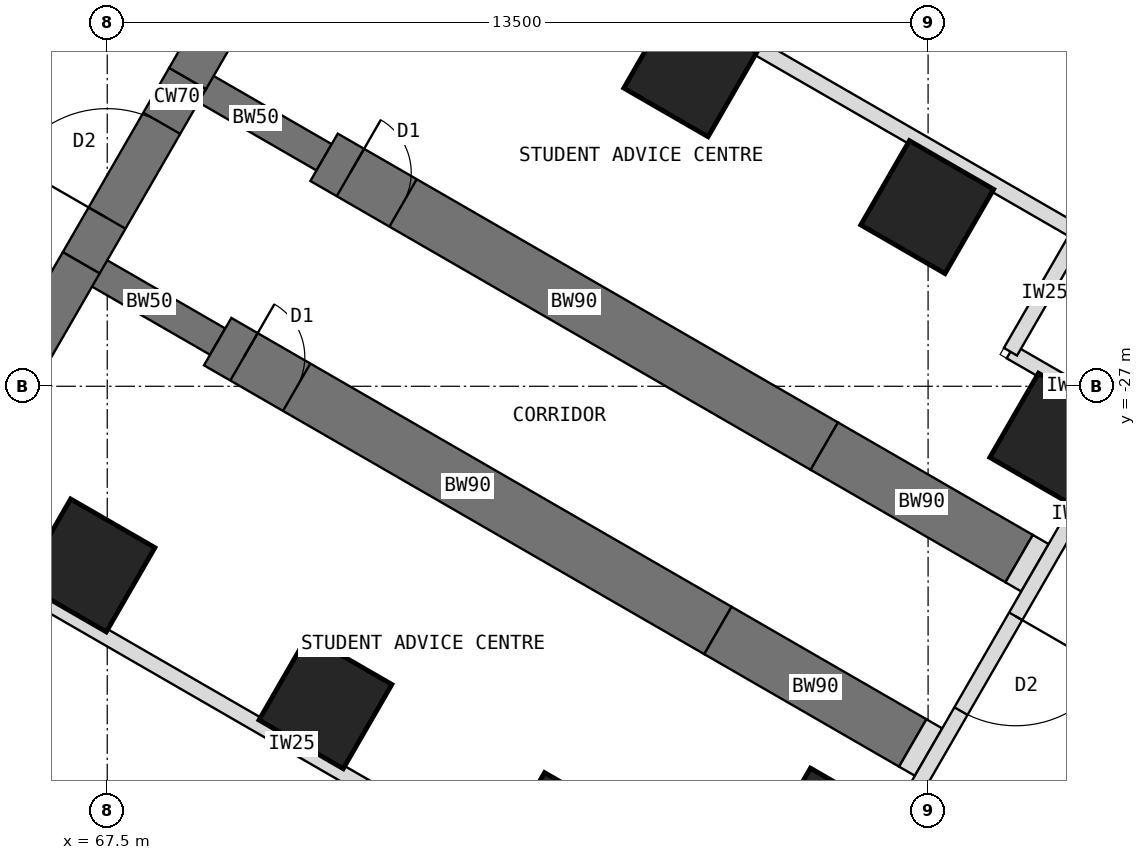
"""IFC4 building model, lengths in metres.
Left out: names, types, materials, properties, quantities, classifications, styles, units other than length and angle.
Written with IfcOpenShell. Run it as: python <this file> out.ifc"""

import sys

from ifc_helpers import new_model, si_unit, direction, frame, frame_2d, origin, origin_2d, place, context, subcontext, project, spatial, rectangle, extrude, element, fill, save


model = new_model("IFC4")
c1 = context("Model", 3, precision=1e-05, world=origin(), true_north=direction((0.0, 1.0)))
c2 = subcontext(c1, "Body", "Model", "MODEL_VIEW")
j1 = project(units=[si_unit("LENGTHUNIT", "METRE"), si_unit("PLANEANGLEUNIT", "RADIAN")], contexts=[c1])
p1 = place(None, origin())
s1 = spatial("IfcSite", under=j1, at=p1, CompositionType="ELEMENT")
p2 = place(p1, origin())
s2 = spatial("IfcBuilding", under=s1, at=p2, CompositionType="ELEMENT")
p3 = place(p2, origin())
s3 = spatial("IfcBuildingStorey", under=s2, at=p3, CompositionType="ELEMENT", Elevation=0.0)
p4 = place(p3, frame((64.798, -28.908, 0.0), z_axis=(0.0, 0.0, 1.0), x_axis=(0.499984222037, 0.866034513004, 0.0)))
e1 = element("IfcWall", 1, at=p4, inside=s3, PredefinedType="SHEAR", context=c2, shape_type="SweptSolid", body=[
    extrude(rectangle(XDim=4.548, YDim=0.7, at=frame_2d((2.274, 0.0))), origin(), (0.0, 0.0, 1.0), 5.5),
])
p5 = place(p3, frame((67.072, -24.97, 0.0), z_axis=(0.0, 0.0, 1.0), x_axis=(0.500010275428, 0.866019471182, 0.0)))
e2 = element("IfcWall", 2, at=p5, inside=s3, PredefinedType="SHEAR", context=c2, shape_type="SweptSolid", body=[
    extrude(rectangle(XDim=3.5, YDim=0.7, at=frame_2d((1.75, 0.0))), origin(), (0.0, 0.0, 1.0), 5.5),
])
p6 = place(p5, frame((0.85, 0.0, 0.0)))
e3 = element("IfcOpeningElement", 3, at=p6, cuts=e2, PredefinedType="OPENING", context=c2, shape_type="SweptSolid", body=[
    extrude(rectangle(XDim=1.8, YDim=2.1, at=frame_2d((0.9, 1.05))), frame((0.0, 0.36, 0.0), z_axis=(0.0, -1.0, 0.0), x_axis=(1.0, 0.0, 0.0)), (0.0, 0.0, 1.0), 0.72),
])
p7 = place(p3, frame((68.822, -21.939, 0.0), z_axis=(0.0, 0.0, 1.0), x_axis=(0.500024481964, 0.866011268655, 0.0)))
e4 = element("IfcWall", 4, at=p7, inside=s3, PredefinedType="SHEAR", context=c2, shape_type="SweptSolid", body=[
    extrude(rectangle(XDim=4.548, YDim=0.7, at=frame_2d((2.274, 0.0))), origin(), (0.0, 0.0, 1.0), 5.5),
])
p8 = place(p3, frame((68.822, -21.939, 0.0), z_axis=(0.0, 0.0, 1.0), x_axis=(0.866072649678, -0.499918158782, 0.0)))
e5 = element("IfcWall", 5, at=p8, inside=s3, PredefinedType="SHEAR", context=c2, shape_type="SweptSolid", body=[
    extrude(rectangle(XDim=2.592, YDim=0.5, at=frame_2d((1.296, 0.0))), origin(), (0.0, 0.0, 1.0), 5.5),
])
p9 = place(p3, frame((71.066, -23.234, 0.0), z_axis=(0.0, 0.0, 1.0), x_axis=(0.86602681393, -0.499997557548, 0.0)))
e6 = element("IfcWall", 6, at=p9, inside=s3, PredefinedType="SHEAR", context=c2, shape_type="SweptSolid", body=[
    extrude(rectangle(XDim=9.5, YDim=0.9, at=frame_2d((4.75, 0.0))), origin(), (0.0, 0.0, 1.0), 5.5),
])
p10 = place(p9, frame((0.5, 0.0, 0.0)))
e7 = element("IfcOpeningElement", 7, at=p10, cuts=e6, PredefinedType="OPENING", context=c2, shape_type="SweptSolid", body=[
    extrude(rectangle(XDim=1.0, YDim=2.1, at=frame_2d((0.5, 1.05))), frame((0.0, 0.46, 0.0), z_axis=(0.0, -1.0, 0.0), x_axis=(1.0, 0.0, 0.0)), (0.0, 0.0, 1.0), 0.92),
])
p11 = place(p3, frame((79.294, -27.984, 0.0), z_axis=(0.0, 0.0, 1.0), x_axis=(0.866000971088, -0.500042316284, 0.0)))
e8 = element("IfcWall", 8, at=p11, inside=s3, PredefinedType="SHEAR", context=c2, shape_type="SweptSolid", body=[
    extrude(rectangle(XDim=3.7, YDim=0.9, at=frame_2d((1.85, 0.0))), origin(), (0.0, 0.0, 1.0), 5.5),
])
p12 = place(p3, frame((67.072, -24.97, 0.0), z_axis=(0.0, 0.0, 1.0), x_axis=(0.866031863473, -0.499988811324, 0.0)))
e9 = element("IfcWall", 9, at=p12, inside=s3, PredefinedType="SHEAR", context=c2, shape_type="SweptSolid", body=[
    extrude(rectangle(XDim=2.592, YDim=0.5, at=frame_2d((1.296, 0.0))), origin(), (0.0, 0.0, 1.0), 5.5),
])
p13 = place(p3, frame((69.316, -26.266, 0.0), z_axis=(0.0, 0.0, 1.0), x_axis=(0.86602681393, -0.499997557548, 0.0)))
e10 = element("IfcWall", 10, at=p13, inside=s3, PredefinedType="SHEAR", context=c2, shape_type="SweptSolid", body=[
    extrude(rectangle(XDim=9.5, YDim=0.9, at=frame_2d((4.75, 0.0))), origin(), (0.0, 0.0, 1.0), 5.5),
])
p14 = place(p13, frame((0.5, 0.0, 0.0)))
e11 = element("IfcOpeningElement", 11, at=p14, cuts=e10, PredefinedType="OPENING", context=c2, shape_type="SweptSolid", body=[
    extrude(rectangle(XDim=1.0, YDim=2.1, at=frame_2d((0.5, 1.05))), frame((0.0, 0.46, 0.0), z_axis=(0.0, -1.0, 0.0), x_axis=(1.0, 0.0, 0.0)), (0.0, 0.0, 1.0), 0.92),
])
p15 = place(p3, frame((77.544, -31.016, 0.0), z_axis=(0.0, 0.0, 1.0), x_axis=(0.866029545028, -0.499992827086, 0.0)))
e12 = element("IfcWall", 12, at=p15, inside=s3, PredefinedType="SHEAR", context=c2, shape_type="SweptSolid", body=[
    extrude(rectangle(XDim=3.7, YDim=0.9, at=frame_2d((1.85, 0.0))), origin(), (0.0, 0.0, 1.0), 5.5),
])
for number, where, z_axis, x_axis in (
    (13, (67.191, -29.946, 0.0), (0.0, 0.0, 1.0), (0.5, 0.866, 0.0)),
    (14, (77.088, -21.804, 0.0), (0.0, 0.0, 1.0), (0.5, 0.866, 0.0)),
    (15, (71.088, -32.196, 0.0), (0.0, 0.0, 1.0), (0.5, 0.866, 0.0)),
    (16, (80.986, -24.054, 0.0), (0.0, 0.0, 1.0), (0.5, 0.866, 0.0)),
    (17, (74.986, -34.446, 0.0), (0.0, 0.0, 1.0), (0.5, 0.866, 0.0)),
    (18, (83.108, -27.877, 0.0), (0.0, 0.0, 1.0), (0.5, 0.866, 0.0)),
    (19, (79.358, -34.373, 0.0), (0.0, 0.0, 1.0), (0.5, 0.866, 0.0)),
):
    element("IfcColumn", number, at=place(p3, frame(where, z_axis=z_axis, x_axis=x_axis)), inside=s3, PredefinedType="COLUMN", context=c2, shape_type="SweptSolid", body=[
        extrude(rectangle(XDim=1.6, YDim=1.6, at=origin_2d()), origin(), (0.0, 0.0, 1.0), 5.5),
    ])
p16 = place(p3, frame((82.498, -29.834, 0.0), z_axis=(0.0, 0.0, 1.0), x_axis=(0.866131372301, -0.499816412211, 0.0)))
e20 = element("IfcWall", 20, at=p16, inside=s3, PredefinedType="PARTITIONING", context=c2, shape_type="SweptSolid", body=[
    extrude(rectangle(XDim=0.3, YDim=0.9, at=frame_2d((0.15, 0.0))), origin(), (0.0, 0.0, 1.0), 5.15),
])
p17 = place(p3, frame((80.748, -32.865, 0.0), z_axis=(0.0, 0.0, 1.0), x_axis=(0.865778900179, -0.500426713919, 0.0)))
e21 = element("IfcWall", 21, at=p17, inside=s3, PredefinedType="PARTITIONING", context=c2, shape_type="SweptSolid", body=[
    extrude(rectangle(XDim=0.3, YDim=0.9, at=frame_2d((0.15, 0.0))), origin(), (0.0, 0.0, 1.0), 5.15),
])
p18 = place(p3, frame((81.0, -22.85, 0.0), z_axis=(0.0, 0.0, 1.0), x_axis=(0.0, 1.0, 0.0)))
e22 = element("IfcWall", 22, at=p18, inside=s3, PredefinedType="PARTITIONING", context=c2, shape_type="SweptSolid", body=[
    extrude(rectangle(XDim=9.35, YDim=0.2, at=frame_2d((4.675, 0.0))), origin(), (0.0, 0.0, 1.0), 5.15),
])
p19 = place(p18, frame((3.775, 0.0, 0.0)))
e23 = element("IfcOpeningElement", 23, at=p19, cuts=e22, PredefinedType="OPENING", context=c2, shape_type="SweptSolid", body=[
    extrude(rectangle(XDim=1.8, YDim=2.4, at=frame_2d((0.9, 1.2))), frame((0.0, 0.11, 0.0), z_axis=(0.0, -1.0, 0.0), x_axis=(1.0, 0.0, 0.0)), (0.0, 0.0, 1.0), 0.22),
])
p20 = place(p3, frame((82.355, -26.432, 0.0), z_axis=(0.0, 0.0, 1.0), x_axis=(0.866017533419, -0.500013631625, 0.0)))
e24 = element("IfcWall", 24, at=p20, inside=s3, PredefinedType="STANDARD", context=c2, shape_type="SweptSolid", body=[
    extrude(rectangle(XDim=2.25, YDim=0.25, at=frame_2d((1.125, 0.0))), origin(), (0.0, 0.0, 1.0), 5.15),
])
p21 = place(p3, frame((84.303, -27.557, 0.0), z_axis=(0.0, 0.0, 1.0), x_axis=(-0.499999662836, -0.866025598446, 0.0)))
e25 = element("IfcWall", 25, at=p21, inside=s3, PredefinedType="STANDARD", context=c2, shape_type="SweptSolid", body=[
    extrude(rectangle(XDim=9.25, YDim=0.25, at=frame_2d((4.625, 0.0))), origin(), (0.0, 0.0, 1.0), 5.15),
])
p22 = place(p21, frame((3.725, 0.0, 0.0)))
e26 = element("IfcOpeningElement", 26, at=p22, cuts=e25, PredefinedType="OPENING", context=c2, shape_type="SweptSolid", body=[
    extrude(rectangle(XDim=1.8, YDim=2.1, at=frame_2d((0.9, 1.05))), frame((0.0, 0.135, 0.0), z_axis=(0.0, -1.0, 0.0), x_axis=(1.0, 0.0, 0.0)), (0.0, 0.0, 1.0), 0.27),
])
for number, where, z_axis, x_axis in (
    (27, (76.605, -36.391, 0.0), (0.0, 0.0, 1.0), (-0.866, 0.5, 0.0)),
    (28, (71.342, -17.476, 0.0), (0.0, 0.0, 1.0), (0.866, -0.5, 0.0)),
):
    element("IfcWall", number, at=place(p3, frame(where, z_axis=z_axis, x_axis=x_axis)), inside=s3, PredefinedType="STANDARD", context=c2, shape_type="SweptSolid", body=[
        extrude(rectangle(XDim=14.016, YDim=0.25, at=frame_2d((7.008, 0.0))), origin(), (0.0, 0.0, 1.0), 5.15),
    ])
p23 = place(p3, frame((83.48, -24.484, 0.0), z_axis=(0.0, 0.0, 1.0), x_axis=(-0.500013631625, -0.866017533419, 0.0)))
e29 = element("IfcWall", 29, at=p23, inside=s3, PredefinedType="STANDARD", context=c2, shape_type="SweptSolid", body=[
    extrude(rectangle(XDim=2.25, YDim=0.25, at=frame_2d((1.125, 0.0))), origin(), (0.0, 0.0, 1.0), 5.15),
])
p24 = place(p6, origin())
e30 = element("IfcDoor", 30, at=p24, inside=s3, OperationType="DOUBLE_DOOR_DOUBLE_SWING", PredefinedType="DOOR", context=c2, shape_type="SweptSolid", body=[
    extrude(rectangle(XDim=1.72, YDim=2.06, at=frame_2d((0.9, 1.03))), frame((0.0, 0.025, 0.0), z_axis=(0.0, -1.0, 0.0), x_axis=(1.0, 0.0, 0.0)), (0.0, 0.0, 1.0), 0.05),
    extrude(rectangle(XDim=0.04, YDim=2.1, at=frame_2d((0.02, 1.05))), frame((0.0, 0.35, 0.0), z_axis=(0.0, -1.0, 0.0), x_axis=(1.0, 0.0, 0.0)), (0.0, 0.0, 1.0), 0.699),
    extrude(rectangle(XDim=0.04, YDim=2.1, at=frame_2d((1.78, 1.05))), frame((0.0, 0.35, 0.0), z_axis=(0.0, -1.0, 0.0), x_axis=(1.0, 0.0, 0.0)), (0.0, 0.0, 1.0), 0.699),
    extrude(rectangle(XDim=1.72, YDim=0.04, at=frame_2d((0.9, 2.08))), frame((0.0, 0.35, 0.0), z_axis=(0.0, -1.0, 0.0), x_axis=(1.0, 0.0, 0.0)), (0.0, 0.0, 1.0), 0.699),
])
fill(e3, e30)
p25 = place(p10, origin())
e31 = element("IfcDoor", 31, at=p25, inside=s3, OperationType="SINGLE_SWING_LEFT", PredefinedType="DOOR", context=c2, shape_type="SweptSolid", body=[
    extrude(rectangle(XDim=0.92, YDim=2.06, at=frame_2d((0.5, 1.03))), frame((0.0, 0.025, 0.0), z_axis=(0.0, -1.0, 0.0), x_axis=(1.0, 0.0, 0.0)), (0.0, 0.0, 1.0), 0.05),
    extrude(rectangle(XDim=0.04, YDim=2.1, at=frame_2d((0.02, 1.05))), frame((0.0, 0.45, 0.0), z_axis=(0.0, -1.0, 0.0), x_axis=(1.0, 0.0, 0.0)), (0.0, 0.0, 1.0), 0.899),
    extrude(rectangle(XDim=0.04, YDim=2.1, at=frame_2d((0.98, 1.05))), frame((0.0, 0.45, 0.0), z_axis=(0.0, -1.0, 0.0), x_axis=(1.0, 0.0, 0.0)), (0.0, 0.0, 1.0), 0.899),
    extrude(rectangle(XDim=0.92, YDim=0.04, at=frame_2d((0.5, 2.08))), frame((0.0, 0.45, 0.0), z_axis=(0.0, -1.0, 0.0), x_axis=(1.0, 0.0, 0.0)), (0.0, 0.0, 1.0), 0.899),
])
fill(e7, e31)
p26 = place(p14, origin())
e32 = element("IfcDoor", 32, at=p26, inside=s3, OperationType="SINGLE_SWING_LEFT", PredefinedType="DOOR", context=c2, shape_type="SweptSolid", body=[
    extrude(rectangle(XDim=0.92, YDim=2.06, at=frame_2d((0.5, 1.03))), frame((0.0, 0.025, 0.0), z_axis=(0.0, -1.0, 0.0), x_axis=(1.0, 0.0, 0.0)), (0.0, 0.0, 1.0), 0.05),
    extrude(rectangle(XDim=0.04, YDim=2.1, at=frame_2d((0.02, 1.05))), frame((0.0, 0.45, 0.0), z_axis=(0.0, -1.0, 0.0), x_axis=(1.0, 0.0, 0.0)), (0.0, 0.0, 1.0), 0.899),
    extrude(rectangle(XDim=0.04, YDim=2.1, at=frame_2d((0.98, 1.05))), frame((0.0, 0.45, 0.0), z_axis=(0.0, -1.0, 0.0), x_axis=(1.0, 0.0, 0.0)), (0.0, 0.0, 1.0), 0.899),
    extrude(rectangle(XDim=0.92, YDim=0.04, at=frame_2d((0.5, 2.08))), frame((0.0, 0.45, 0.0), z_axis=(0.0, -1.0, 0.0), x_axis=(1.0, 0.0, 0.0)), (0.0, 0.0, 1.0), 0.899),
])
fill(e11, e32)
p27 = place(p22, origin())
e33 = element("IfcDoor", 33, at=p27, inside=s3, OperationType="DOUBLE_DOOR_DOUBLE_SWING", PredefinedType="DOOR", context=c2, shape_type="SweptSolid", body=[
    extrude(rectangle(XDim=1.8, YDim=2.1, at=frame_2d((0.9, 1.05))), frame((0.0, 0.025, 0.0), z_axis=(0.0, -1.0, 0.0), x_axis=(1.0, 0.0, 0.0)), (0.0, 0.0, 1.0), 0.05),
])
fill(e26, e33)
save(model, sys.argv[1])
